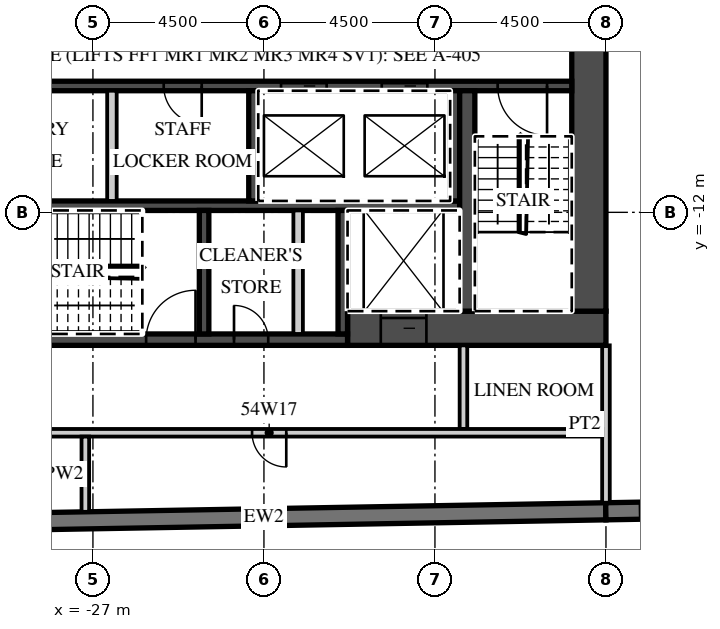
"""IFC4 building model, lengths in metres.
Left out: names, types, materials, properties, quantities, classifications, styles, units other than length and angle.
Written with IfcOpenShell. Run it as: python <this file> out.ifc"""

import sys

from ifc_helpers import new_model, si_unit, direction, frame, frame_2d, origin, place, context, subcontext, project, spatial, rectangle, extrude, element, fill, save


model = new_model("IFC4")
c1 = context("Model", 3, precision=1e-05, world=origin(), true_north=direction((0.0, 1.0)))
c2 = subcontext(c1, "Body", "Model", "MODEL_VIEW")
j1 = project(units=[si_unit("LENGTHUNIT", "METRE"), si_unit("PLANEANGLEUNIT", "RADIAN")], contexts=[c1])
p1 = place(None, origin())
s1 = spatial("IfcSite", under=j1, at=p1, CompositionType="ELEMENT")
p2 = place(p1, origin())
s2 = spatial("IfcBuilding", under=s1, at=p2, CompositionType="ELEMENT")
p3 = place(p2, frame((0.0, 0.0, 224.3)))
s3 = spatial("IfcBuildingStorey", under=s2, at=p3, CompositionType="ELEMENT", Elevation=224.3)
p4 = place(p3, frame((-31.504, -20.18, 0.0), z_axis=(0.0, 0.0, 1.0), x_axis=(0.999847677887, 0.017453395744, 0.0)))
e1 = element("IfcWall", 1, at=p4, inside=s3, PredefinedType="SOLIDWALL", context=c2, shape_type="SweptSolid", body=[
    extrude(rectangle(XDim=18.003, YDim=0.45, at=frame_2d((9.001, 0.0))), origin(), (0.0, 0.0, 1.0), 3.02),
])
p5 = place(p3, frame((-13.504, -19.866, 0.0), z_axis=(0.0, 0.0, 1.0), x_axis=(0.999847672978, 0.017453676992, 0.0)))
e2 = element("IfcWall", 2, at=p5, inside=s3, PredefinedType="SOLIDWALL", context=c2, shape_type="SweptSolid", body=[
    extrude(rectangle(XDim=52.86, YDim=0.45, at=frame_2d((26.43, 0.0))), origin(), (0.0, 0.0, 1.0), 3.02),
])
p6 = place(p5, frame((0.9, 0.0, 0.45)))
e3 = element("IfcOpeningElement", 3, at=p6, cuts=e2, PredefinedType="OPENING", context=c2, shape_type="SweptSolid", body=[
    extrude(rectangle(XDim=2.7, YDim=2.25, at=frame_2d((1.35, 1.125))), frame((0.0, 0.235, 0.0), z_axis=(0.0, -1.0, 0.0), x_axis=(1.0, 0.0, 0.0)), (0.0, 0.0, 1.0), 0.47),
])
p7 = place(p5, frame((5.401, 0.0, 0.45)))
e4 = element("IfcOpeningElement", 4, at=p7, cuts=e2, PredefinedType="OPENING", context=c2, shape_type="SweptSolid", body=[
    extrude(rectangle(XDim=2.7, YDim=2.25, at=frame_2d((1.35, 1.125))), frame((0.0, 0.235, 0.0), z_axis=(0.0, -1.0, 0.0), x_axis=(1.0, 0.0, 0.0)), (0.0, 0.0, 1.0), 0.47),
])
p8 = place(p5, frame((9.902, 0.0, 0.45)))
e5 = element("IfcOpeningElement", 5, at=p8, cuts=e2, PredefinedType="OPENING", context=c2, shape_type="SweptSolid", body=[
    extrude(rectangle(XDim=2.7, YDim=2.25, at=frame_2d((1.35, 1.125))), frame((0.0, 0.235, 0.0), z_axis=(0.0, -1.0, 0.0), x_axis=(1.0, 0.0, 0.0)), (0.0, 0.0, 1.0), 0.47),
])
p9 = place(p5, frame((14.402, 0.0, 0.45)))
e6 = element("IfcOpeningElement", 6, at=p9, cuts=e2, PredefinedType="OPENING", context=c2, shape_type="SweptSolid", body=[
    extrude(rectangle(XDim=2.7, YDim=2.25, at=frame_2d((1.35, 1.125))), frame((0.0, 0.235, 0.0), z_axis=(0.0, -1.0, 0.0), x_axis=(1.0, 0.0, 0.0)), (0.0, 0.0, 1.0), 0.47),
])
p10 = place(p5, frame((18.903, 0.0, 0.45)))
e7 = element("IfcOpeningElement", 7, at=p10, cuts=e2, PredefinedType="OPENING", context=c2, shape_type="SweptSolid", body=[
    extrude(rectangle(XDim=2.7, YDim=2.25, at=frame_2d((1.35, 1.125))), frame((0.0, 0.235, 0.0), z_axis=(0.0, -1.0, 0.0), x_axis=(1.0, 0.0, 0.0)), (0.0, 0.0, 1.0), 0.47),
])
p11 = place(p5, frame((23.404, 0.0, 0.45)))
e8 = element("IfcOpeningElement", 8, at=p11, cuts=e2, PredefinedType="OPENING", context=c2, shape_type="SweptSolid", body=[
    extrude(rectangle(XDim=2.7, YDim=2.25, at=frame_2d((1.35, 1.125))), frame((0.0, 0.235, 0.0), z_axis=(0.0, -1.0, 0.0), x_axis=(1.0, 0.0, 0.0)), (0.0, 0.0, 1.0), 0.47),
])
p12 = place(p5, frame((27.904, 0.0, 0.45)))
e9 = element("IfcOpeningElement", 9, at=p12, cuts=e2, PredefinedType="OPENING", context=c2, shape_type="SweptSolid", body=[
    extrude(rectangle(XDim=2.7, YDim=2.25, at=frame_2d((1.35, 1.125))), frame((0.0, 0.235, 0.0), z_axis=(0.0, -1.0, 0.0), x_axis=(1.0, 0.0, 0.0)), (0.0, 0.0, 1.0), 0.47),
])
p13 = place(p5, frame((32.405, 0.0, 0.45)))
e10 = element("IfcOpeningElement", 10, at=p13, cuts=e2, PredefinedType="OPENING", context=c2, shape_type="SweptSolid", body=[
    extrude(rectangle(XDim=2.7, YDim=2.25, at=frame_2d((1.35, 1.125))), frame((0.0, 0.235, 0.0), z_axis=(0.0, -1.0, 0.0), x_axis=(1.0, 0.0, 0.0)), (0.0, 0.0, 1.0), 0.47),
])
p14 = place(p5, frame((36.906, 0.0, 0.45)))
e11 = element("IfcOpeningElement", 11, at=p14, cuts=e2, PredefinedType="OPENING", context=c2, shape_type="SweptSolid", body=[
    extrude(rectangle(XDim=2.7, YDim=2.25, at=frame_2d((1.35, 1.125))), frame((0.0, 0.235, 0.0), z_axis=(0.0, -1.0, 0.0), x_axis=(1.0, 0.0, 0.0)), (0.0, 0.0, 1.0), 0.47),
])
p15 = place(p5, frame((41.406, 0.0, 0.45)))
e12 = element("IfcOpeningElement", 12, at=p15, cuts=e2, PredefinedType="OPENING", context=c2, shape_type="SweptSolid", body=[
    extrude(rectangle(XDim=2.7, YDim=2.25, at=frame_2d((1.35, 1.125))), frame((0.0, 0.235, 0.0), z_axis=(0.0, -1.0, 0.0), x_axis=(1.0, 0.0, 0.0)), (0.0, 0.0, 1.0), 0.47),
])
p16 = place(p5, frame((45.907, 0.0, 0.45)))
e13 = element("IfcOpeningElement", 13, at=p16, cuts=e2, PredefinedType="OPENING", context=c2, shape_type="SweptSolid", body=[
    extrude(rectangle(XDim=2.7, YDim=2.25, at=frame_2d((1.35, 1.125))), frame((0.0, 0.235, 0.0), z_axis=(0.0, -1.0, 0.0), x_axis=(1.0, 0.0, 0.0)), (0.0, 0.0, 1.0), 0.47),
])
p17 = place(p3, frame((-13.5, -19.641, 0.0), z_axis=(0.0, 0.0, 1.0), x_axis=(0.0, 1.0, 0.0)))
e14 = element("IfcWall", 14, at=p17, inside=s3, PredefinedType="PARTITIONING", context=c2, shape_type="SweptSolid", body=[
    extrude(rectangle(XDim=4.141, YDim=0.2, at=frame_2d((2.071, 0.0))), origin(), (0.0, 0.0, 1.0), 3.02),
])
p18 = place(p3, frame((-20.3, -15.05, 0.0), z_axis=(0.0, 0.0, 1.0), x_axis=(1.0, 0.0, 0.0)))
e15 = element("IfcWall", 15, at=p18, inside=s3, PredefinedType="SHEAR", context=c2, shape_type="SweptSolid", body=[
    extrude(rectangle(XDim=6.8, YDim=0.9, at=frame_2d((3.4, 0.0))), origin(), (0.0, 0.0, 1.0), 3.02),
])
p19 = place(p18, frame((0.875, 0.0, 0.0)))
e16 = element("IfcOpeningElement", 16, at=p19, cuts=e15, PredefinedType="OPENING", context=c2, shape_type="SweptSolid", body=[
    extrude(rectangle(XDim=1.2, YDim=2.1, at=frame_2d((0.6, 1.05))), frame((0.0, 0.46, 0.0), z_axis=(0.0, -1.0, 0.0), x_axis=(1.0, 0.0, 0.0)), (0.0, 0.0, 1.0), 0.92),
])
p20 = place(p3, frame((-30.6, -15.35, 0.0), z_axis=(0.0, 0.0, 1.0), x_axis=(1.0, 0.0, 0.0)))
e17 = element("IfcWall", 17, at=p20, inside=s3, PredefinedType="SHEAR", context=c2, shape_type="SweptSolid", body=[
    extrude(rectangle(XDim=10.3, YDim=0.3, at=frame_2d((5.15, 0.0))), origin(), (0.0, 0.0, 1.0), 3.02),
])
p21 = place(p20, frame((5.0, 0.0, 0.0)))
e18 = element("IfcOpeningElement", 18, at=p21, cuts=e17, PredefinedType="OPENING", context=c2, shape_type="SweptSolid", body=[
    extrude(rectangle(XDim=1.3, YDim=2.1, at=frame_2d((0.65, 1.05))), frame((0.0, 0.16, 0.0), z_axis=(0.0, -1.0, 0.0), x_axis=(1.0, 0.0, 0.0)), (0.0, 0.0, 1.0), 0.32),
])
p22 = place(p20, frame((7.312, 0.0, 0.0)))
e19 = element("IfcOpeningElement", 19, at=p22, cuts=e17, PredefinedType="OPENING", context=c2, shape_type="SweptSolid", body=[
    extrude(rectangle(XDim=0.9, YDim=2.1, at=frame_2d((0.45, 1.05))), frame((0.0, 0.16, 0.0), z_axis=(0.0, -1.0, 0.0), x_axis=(1.0, 0.0, 0.0)), (0.0, 0.0, 1.0), 0.32),
])
p23 = place(p3, frame((-13.95, -14.6, 0.0), z_axis=(0.0, 0.0, 1.0), x_axis=(0.0, 1.0, 0.0)))
e20 = element("IfcWall", 20, at=p23, inside=s3, PredefinedType="SHEAR", context=c2, shape_type="SweptSolid", body=[
    extrude(rectangle(XDim=12.2, YDim=0.9, at=frame_2d((6.1, 0.0))), origin(), (0.0, 0.0, 1.0), 3.02),
])
p24 = place(p3, frame((-30.6, -8.675, 0.0), z_axis=(0.0, 0.0, 1.0), x_axis=(1.0, 0.0, 0.0)))
e21 = element("IfcWall", 21, at=p24, inside=s3, PredefinedType="SHEAR", context=c2, shape_type="SweptSolid", body=[
    extrude(rectangle(XDim=16.2, YDim=0.25, at=frame_2d((8.1, 0.0))), origin(), (0.0, 0.0, 1.0), 3.02),
])
p25 = place(p24, frame((8.55, 0.0, 0.0)))
e22 = element("IfcOpeningElement", 22, at=p25, cuts=e21, PredefinedType="OPENING", context=c2, shape_type="SweptSolid", body=[
    extrude(rectangle(XDim=1.2, YDim=2.1, at=frame_2d((0.6, 1.05))), frame((0.0, 0.135, 0.0), z_axis=(0.0, -1.0, 0.0), x_axis=(1.0, 0.0, 0.0)), (0.0, 0.0, 1.0), 0.27),
])
p26 = place(p24, frame((11.2, 0.0, 0.0)))
e23 = element("IfcOpeningElement", 23, at=p26, cuts=e21, PredefinedType="OPENING", context=c2, shape_type="SweptSolid", body=[
    extrude(rectangle(XDim=1.2, YDim=2.1, at=frame_2d((0.6, 1.05))), frame((0.0, 0.135, 0.0), z_axis=(0.0, -1.0, 0.0), x_axis=(1.0, 0.0, 0.0)), (0.0, 0.0, 1.0), 0.27),
])
p27 = place(p24, frame((14.25, 0.0, 0.0)))
e24 = element("IfcOpeningElement", 24, at=p27, cuts=e21, PredefinedType="OPENING", context=c2, shape_type="SweptSolid", body=[
    extrude(rectangle(XDim=1.3, YDim=2.1, at=frame_2d((0.65, 1.05))), frame((0.0, 0.135, 0.0), z_axis=(0.0, -1.0, 0.0), x_axis=(1.0, 0.0, 0.0)), (0.0, 0.0, 1.0), 0.27),
])
p28 = place(p24, frame((1.488, 0.0, 0.0)))
e25 = element("IfcOpeningElement", 25, at=p28, cuts=e21, PredefinedType="OPENING", context=c2, shape_type="SweptSolid", body=[
    extrude(rectangle(XDim=1.0, YDim=2.1, at=frame_2d((0.5, 1.05))), frame((0.0, 0.135, 0.0), z_axis=(0.0, -1.0, 0.0), x_axis=(1.0, 0.0, 0.0)), (0.0, 0.0, 1.0), 0.27),
])
p29 = place(p24, frame((5.462, 0.0, 0.0)))
e26 = element("IfcOpeningElement", 26, at=p29, cuts=e21, PredefinedType="OPENING", context=c2, shape_type="SweptSolid", body=[
    extrude(rectangle(XDim=1.0, YDim=2.1, at=frame_2d((0.5, 1.05))), frame((0.0, 0.135, 0.0), z_axis=(0.0, -1.0, 0.0), x_axis=(1.0, 0.0, 0.0)), (0.0, 0.0, 1.0), 0.27),
])
p30 = place(p3, frame((-30.6, -11.825, 0.0), z_axis=(0.0, 0.0, 1.0), x_axis=(1.0, 0.0, 0.0)))
e27 = element("IfcWall", 27, at=p30, inside=s3, PredefinedType="SHEAR", context=c2, shape_type="SweptSolid", body=[
    extrude(rectangle(XDim=13.25, YDim=0.25, at=frame_2d((6.625, 0.0))), origin(), (0.0, 0.0, 1.0), 3.02),
])
for number, where, z_axis, x_axis in (
    (28, (-17.475, -11.7, 0.0), (0.0, 0.0, 1.0), (0.0, 1.0, 0.0)),
    (29, (-22.775, -11.7, 0.0), (0.0, 0.0, 1.0), (0.0, 1.0, 0.0)),
):
    element("IfcWall", number, at=place(p3, frame(where, z_axis=z_axis, x_axis=x_axis)), inside=s3, PredefinedType="SHEAR", context=c2, shape_type="SweptSolid", body=[
        extrude(rectangle(XDim=2.9, YDim=0.25, at=frame_2d((1.45, 0.0))), origin(), (0.0, 0.0, 1.0), 3.02),
    ])
p31 = place(p3, frame((-26.5, -11.7, 0.0), z_axis=(0.0, 0.0, 1.0), x_axis=(0.0, 1.0, 0.0)))
e30 = element("IfcWall", 30, at=p31, inside=s3, PredefinedType="PARTITIONING", context=c2, shape_type="SweptSolid", body=[
    extrude(rectangle(XDim=2.9, YDim=0.25, at=frame_2d((1.45, 0.0))), origin(), (0.0, 0.0, 1.0), 3.02),
])
p32 = place(p3, frame((-17.15, -14.6, 0.0), z_axis=(0.0, 0.0, 1.0), x_axis=(0.0, 1.0, 0.0)))
e31 = element("IfcWall", 31, at=p32, inside=s3, PredefinedType="SHEAR", context=c2, shape_type="SweptSolid", body=[
    extrude(rectangle(XDim=5.8, YDim=0.4, at=frame_2d((2.9, 0.0))), origin(), (0.0, 0.0, 1.0), 3.02),
])
for number, where, z_axis, x_axis in (
    (32, (-20.425, -15.2, 0.0), (0.0, 0.0, 1.0), (0.0, 1.0, 0.0)),
    (33, (-24.075, -15.2, 0.0), (0.0, 0.0, 1.0), (0.0, 1.0, 0.0)),
):
    element("IfcWall", number, at=place(p3, frame(where, z_axis=z_axis, x_axis=x_axis)), inside=s3, PredefinedType="SHEAR", context=c2, shape_type="SweptSolid", body=[
        extrude(rectangle(XDim=3.25, YDim=0.25, at=frame_2d((1.625, 0.0))), origin(), (0.0, 0.0, 1.0), 3.02),
    ])
p33 = place(p3, frame((-21.6, -15.2, 0.0), z_axis=(0.0, 0.0, 1.0), x_axis=(0.0, 1.0, 0.0)))
e34 = element("IfcWall", 34, at=p33, inside=s3, PredefinedType="PARTITIONING", context=c2, shape_type="SweptSolid", body=[
    extrude(rectangle(XDim=3.25, YDim=0.25, at=frame_2d((1.625, 0.0))), origin(), (0.0, 0.0, 1.0), 3.02),
])
p34 = place(p3, frame((-17.25, -17.7, 0.0), z_axis=(0.0, 0.0, 1.0), x_axis=(0.0, 1.0, 0.0)))
e35 = element("IfcWall", 35, at=p34, inside=s3, PredefinedType="PARTITIONING", context=c2, shape_type="SweptSolid", body=[
    extrude(rectangle(XDim=2.2, YDim=0.2, at=frame_2d((1.1, 0.0))), origin(), (0.0, 0.0, 1.0), 3.02),
])
p35 = place(p3, frame((-35.864, -17.8, 0.0), z_axis=(0.0, 0.0, 1.0), x_axis=(1.0, 0.0, 0.0)))
e36 = element("IfcWall", 36, at=p35, inside=s3, PredefinedType="PARTITIONING", context=c2, shape_type="SweptSolid", body=[
    extrude(rectangle(XDim=22.264, YDim=0.2, at=frame_2d((11.132, 0.0))), origin(), (0.0, 0.0, 1.0), 3.02),
])
p36 = place(p35, frame((4.751, 0.0, 0.0)))
e37 = element("IfcOpeningElement", 37, at=p36, cuts=e36, PredefinedType="OPENING", context=c2, shape_type="SweptSolid", body=[
    extrude(rectangle(XDim=0.9, YDim=2.1, at=frame_2d((0.45, 1.05))), frame((0.0, 0.11, 0.0), z_axis=(0.0, -1.0, 0.0), x_axis=(1.0, 0.0, 0.0)), (0.0, 0.0, 1.0), 0.22),
])
p37 = place(p35, frame((13.051, 0.0, 0.0)))
e38 = element("IfcOpeningElement", 38, at=p37, cuts=e36, PredefinedType="OPENING", context=c2, shape_type="SweptSolid", body=[
    extrude(rectangle(XDim=0.9, YDim=2.1, at=frame_2d((0.45, 1.05))), frame((0.0, 0.11, 0.0), z_axis=(0.0, -1.0, 0.0), x_axis=(1.0, 0.0, 0.0)), (0.0, 0.0, 1.0), 0.22),
])
p38 = place(p3, frame((-27.2, -19.88, 0.0), z_axis=(0.0, 0.0, 1.0), x_axis=(0.0, 1.0, 0.0)))
e39 = element("IfcWall", 39, at=p38, inside=s3, PredefinedType="PARTITIONING", context=c2, shape_type="SweptSolid", body=[
    extrude(rectangle(XDim=1.98, YDim=0.2, at=frame_2d((0.99, 0.0))), origin(), (0.0, 0.0, 1.0), 3.02),
])
p39 = place(p6, origin())
e40 = element("IfcWindow", 40, at=p39, inside=s3, PartitioningType="SINGLE_PANEL", PredefinedType="WINDOW", context=c2, shape_type="SweptSolid", body=[
    extrude(rectangle(XDim=2.7, YDim=2.25, at=frame_2d((1.35, 1.125))), frame((0.0, 0.09, 0.0), z_axis=(0.0, -1.0, 0.0), x_axis=(1.0, 0.0, 0.0)), (0.0, 0.0, 1.0), 0.06),
])
fill(e3, e40)
p40 = place(p25, origin())
e41 = element("IfcDoor", 41, at=p40, inside=s3, OperationType="SLIDING_TO_LEFT", PredefinedType="DOOR", context=c2, shape_type="SweptSolid", body=[
    extrude(rectangle(XDim=1.2, YDim=2.1, at=frame_2d((0.6, 1.05))), frame((0.0, 0.025, 0.0), z_axis=(0.0, -1.0, 0.0), x_axis=(1.0, 0.0, 0.0)), (0.0, 0.0, 1.0), 0.05),
])
fill(e22, e41)
p41 = place(p26, origin())
e42 = element("IfcDoor", 42, at=p41, inside=s3, OperationType="SLIDING_TO_RIGHT", PredefinedType="DOOR", context=c2, shape_type="SweptSolid", body=[
    extrude(rectangle(XDim=1.2, YDim=2.1, at=frame_2d((0.6, 1.05))), frame((0.0, 0.025, 0.0), z_axis=(0.0, -1.0, 0.0), x_axis=(1.0, 0.0, 0.0)), (0.0, 0.0, 1.0), 0.05),
])
fill(e23, e42)
p42 = place(p19, origin())
e43 = element("IfcDoor", 43, at=p42, inside=s3, OperationType="SLIDING_TO_LEFT", PredefinedType="DOOR", context=c2, shape_type="SweptSolid", body=[
    extrude(rectangle(XDim=1.2, YDim=2.1, at=frame_2d((0.6, 1.05))), frame((0.0, 0.025, 0.0), z_axis=(0.0, -1.0, 0.0), x_axis=(1.0, 0.0, 0.0)), (0.0, 0.0, 1.0), 0.05),
])
fill(e16, e43)
p43 = place(p27, origin())
e44 = element("IfcDoor", 44, at=p43, inside=s3, OperationType="SINGLE_SWING_RIGHT", PredefinedType="DOOR", context=c2, shape_type="SweptSolid", body=[
    extrude(rectangle(XDim=1.3, YDim=2.1, at=frame_2d((0.65, 1.05))), frame((0.0, 0.025, 0.0), z_axis=(0.0, -1.0, 0.0), x_axis=(1.0, 0.0, 0.0)), (0.0, 0.0, 1.0), 0.05),
])
fill(e24, e44)
p44 = place(p21, origin())
e45 = element("IfcDoor", 45, at=p44, inside=s3, OperationType="SINGLE_SWING_RIGHT", PredefinedType="DOOR", context=c2, shape_type="SweptSolid", body=[
    extrude(rectangle(XDim=1.3, YDim=2.1, at=frame_2d((0.65, 1.05))), frame((0.0, 0.025, 0.0), z_axis=(0.0, -1.0, 0.0), x_axis=(1.0, 0.0, 0.0)), (0.0, 0.0, 1.0), 0.05),
])
fill(e18, e45)
p45 = place(p22, origin())
e46 = element("IfcDoor", 46, at=p45, inside=s3, OperationType="SINGLE_SWING_LEFT", PredefinedType="DOOR", context=c2, shape_type="SweptSolid", body=[
    extrude(rectangle(XDim=0.9, YDim=2.1, at=frame_2d((0.45, 1.05))), frame((0.0, 0.025, 0.0), z_axis=(0.0, -1.0, 0.0), x_axis=(1.0, 0.0, 0.0)), (0.0, 0.0, 1.0), 0.05),
])
fill(e19, e46)
p46 = place(p29, origin())
e47 = element("IfcDoor", 47, at=p46, inside=s3, OperationType="SINGLE_SWING_RIGHT", PredefinedType="DOOR", context=c2, shape_type="SweptSolid", body=[
    extrude(rectangle(XDim=1.0, YDim=2.1, at=frame_2d((0.5, 1.05))), frame((0.0, 0.025, 0.0), z_axis=(0.0, -1.0, 0.0), x_axis=(1.0, 0.0, 0.0)), (0.0, 0.0, 1.0), 0.05),
])
fill(e26, e47)
p47 = place(p37, origin())
e48 = element("IfcDoor", 48, at=p47, inside=s3, OperationType="SINGLE_SWING_RIGHT", PredefinedType="DOOR", context=c2, shape_type="SweptSolid", body=[
    extrude(rectangle(XDim=0.9, YDim=2.1, at=frame_2d((0.45, 1.05))), frame((0.0, 0.025, 0.0), z_axis=(0.0, -1.0, 0.0), x_axis=(1.0, 0.0, 0.0)), (0.0, 0.0, 1.0), 0.05),
])
fill(e38, e48)
save(model, sys.argv[1])
